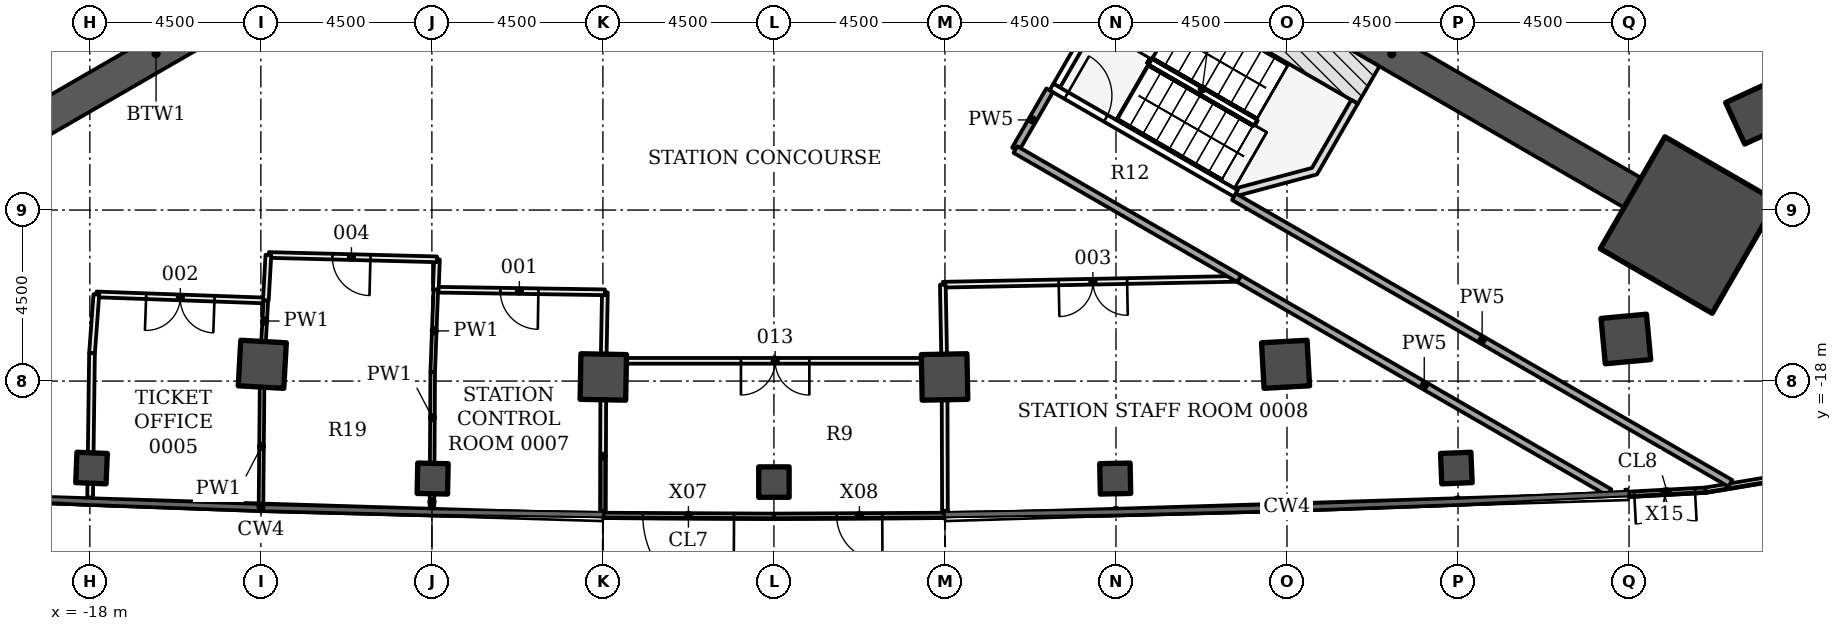
"""IFC4 building model, lengths in metres.
Left out: names, types, materials, properties, quantities, classifications, styles, units other than length and angle.
Written with IfcOpenShell. Run it as: python <this file> out.ifc"""

import sys

from ifc_helpers import new_model, si_unit, direction, frame, frame_2d, origin, origin_2d, place, context, subcontext, project, spatial, polyline, rectangle, outline, extrude, element, fill, save


model = new_model("IFC4")
c1 = context("Model", 3, precision=1e-05, world=origin(), true_north=direction((0.0, 1.0)))
c2 = subcontext(c1, "Body", "Model", "MODEL_VIEW")
j1 = project(units=[si_unit("LENGTHUNIT", "METRE"), si_unit("PLANEANGLEUNIT", "RADIAN")], contexts=[c1])
p1 = place(None, origin())
s1 = spatial("IfcSite", under=j1, at=p1, CompositionType="ELEMENT")
p2 = place(p1, origin())
s2 = spatial("IfcBuilding", under=s1, at=p2, CompositionType="ELEMENT")
p3 = place(p2, origin())
s3 = spatial("IfcBuildingStorey", under=s2, at=p3, CompositionType="ELEMENT", Elevation=0.0)
for number, where, z_axis, x_axis in (
    (1, (-13.462, -17.558, -0.25), (0.0, 0.0, 1.0), (-0.056, -0.998, 0.0)),
    (2, (-4.49, -17.892, -0.25), (0.0, 0.0, 1.0), (-0.019, -1.0, 0.0)),
    (3, (4.49, -17.892, -0.25), (0.0, 0.0, 1.0), (0.019, -1.0, 0.0)),
    (4, (13.462, -17.558, -0.25), (0.0, 0.0, 1.0), (0.056, -0.998, 0.0)),
    (5, (22.417, -16.893, -0.25), (0.0, 0.0, 1.0), (0.093, -0.996, 0.0)),
    (6, (25.838, -10.967, -0.25), (0.0, 0.0, 1.0), (0.909, 0.418, 0.0)),
):
    element("IfcColumn", number, at=place(p3, frame(where, z_axis=z_axis, x_axis=x_axis)), inside=s3, PredefinedType="COLUMN", context=c2, shape_type="SweptSolid", body=[
        extrude(rectangle(XDim=1.2, YDim=1.2, at=origin_2d()), origin(), (0.0, 0.0, 1.0), 6.0),
    ])
for number, where, z_axis, x_axis in (
    (7, (-17.956, -20.288, -0.25), (0.0, 0.0, 1.0), (-0.041, -0.999, 0.0)),
    (8, (-8.98, -20.565, -0.25), (0.0, 0.0, 1.0), (-0.021, -1.0, 0.0)),
    (9, (0.0, -20.657, -0.25), (0.0, 0.0, 1.0), (0.0, -1.0, 0.0)),
    (10, (8.98, -20.565, -0.25), (0.0, 0.0, 1.0), (0.021, -1.0, 0.0)),
    (11, (17.956, -20.288, -0.25), (0.0, 0.0, 1.0), (0.041, -0.999, 0.0)),
):
    element("IfcColumn", number, at=place(p3, frame(where, z_axis=z_axis, x_axis=x_axis)), inside=s3, PredefinedType="COLUMN", context=c2, shape_type="SweptSolid", body=[
        extrude(rectangle(XDim=0.8, YDim=0.8, at=origin_2d()), origin(), (0.0, 0.0, 1.0), 6.0),
    ])
for number, where, z_axis, x_axis in (
    (12, (-9.922, -5.728, -0.25), (0.0, 0.0, 1.0), (-0.866, -0.5, 0.0)),
    (13, (9.922, -5.728, -0.25), (0.0, 0.0, 1.0), (0.866, -0.5, 0.0)),
):
    element("IfcWall", number, at=place(p3, frame(where, z_axis=z_axis, x_axis=x_axis)), inside=s3, PredefinedType="SHEAR", context=c2, shape_type="SweptSolid", body=[
        extrude(rectangle(XDim=14.633, YDim=0.9, at=frame_2d((7.316, 0.0))), origin(), (0.0, 0.0, 1.0), 6.0),
    ])
p4 = place(p3, frame((24.066, -13.895, -0.25), z_axis=(0.0, 0.0, 1.0), x_axis=(0.866025403784, -0.5, 0.0)))
e14 = element("IfcColumn", 14, at=p4, inside=s3, PredefinedType="COLUMN", context=c2, shape_type="SweptSolid", body=[
    extrude(rectangle(XDim=3.4, YDim=3.4, at=origin_2d()), origin(), (0.0, 0.0, 1.0), 6.0),
])
p5 = place(p3, frame((-0.002, -21.547, 0.0), z_axis=(0.0, 0.0, 1.0), x_axis=(-0.999986693461, 0.005158769258, 0.0)))
e15 = element("IfcWall", 15, at=p5, inside=s3, PredefinedType="NOTDEFINED", context=c2, shape_type="SweptSolid", body=[
    extrude(rectangle(XDim=4.496, YDim=0.12, at=frame_2d((2.248, 0.0))), origin(), (0.0, 0.0, 1.0), 5.75),
])
p6 = place(p5, frame((1.048, 0.0, 0.0)))
e16 = element("IfcOpeningElement", 16, at=p6, cuts=e15, PredefinedType="OPENING", context=c2, shape_type="SweptSolid", body=[
    extrude(rectangle(XDim=2.4, YDim=2.4, at=frame_2d((1.2, 1.2))), frame((0.0, 0.07, 0.0), z_axis=(0.0, -1.0, 0.0), x_axis=(1.0, 0.0, 0.0)), (0.0, 0.0, 1.0), 0.14),
])
p7 = place(p3, frame((4.498, -21.524, 0.0), z_axis=(0.0, 0.0, 1.0), x_axis=(-0.999986693461, -0.005158769258, 0.0)))
e17 = element("IfcWall", 17, at=p7, inside=s3, PredefinedType="NOTDEFINED", context=c2, shape_type="SweptSolid", body=[
    extrude(rectangle(XDim=4.496, YDim=0.12, at=frame_2d((2.248, 0.0))), origin(), (0.0, 0.0, 1.0), 5.75),
])
p8 = place(p7, frame((1.648, 0.0, 0.0)))
e18 = element("IfcOpeningElement", 18, at=p8, cuts=e17, PredefinedType="OPENING", context=c2, shape_type="SweptSolid", body=[
    extrude(rectangle(XDim=1.2, YDim=2.4, at=frame_2d((0.6, 1.2))), frame((0.0, 0.07, 0.0), z_axis=(0.0, -1.0, 0.0), x_axis=(1.0, 0.0, 0.0)), (0.0, 0.0, 1.0), 0.14),
])
p9 = place(p3, frame((24.517, -20.861, 0.0), z_axis=(0.0, 0.0, 1.0), x_axis=(-0.998561127478, -0.053625317623, 0.0)))
e19 = element("IfcWall", 19, at=p9, inside=s3, PredefinedType="NOTDEFINED", context=c2, shape_type="SweptSolid", body=[
    extrude(rectangle(XDim=2.031, YDim=0.12, at=frame_2d((1.015, 0.0))), origin(), (0.0, 0.0, 1.0), 5.75),
])
p10 = place(p9, frame((0.283, 0.0, 0.0)))
e20 = element("IfcOpeningElement", 20, at=p10, cuts=e19, PredefinedType="OPENING", context=c2, shape_type="SweptSolid", body=[
    extrude(rectangle(XDim=1.6, YDim=2.4, at=frame_2d((0.8, 1.2))), frame((0.0, 0.07, 0.0), z_axis=(0.0, -1.0, 0.0), x_axis=(1.0, 0.0, 0.0)), (0.0, 0.0, 1.0), 0.14),
])
p11 = place(p3, origin())
e21 = element("IfcWall", 21, at=p11, inside=s3, PredefinedType="NOTDEFINED", context=c2, shape_type="SweptSolid", body=[
    extrude(outline(polyline([(24.522, -20.921), (26.04, -20.666), (27.465, -20.086), (28.729, -19.209), (29.771, -18.077), (30.54, -16.744), (31.0, -15.276), (31.128, -13.742), (30.917, -12.218), (30.379, -10.776), (30.266, -10.818), (30.8, -12.247), (31.007, -13.745), (30.881, -15.252), (30.43, -16.696), (29.674, -18.005), (28.65, -19.118), (27.407, -19.98), (26.007, -20.55), (24.502, -20.802), (24.522, -20.921)])), origin(), (0.0, 0.0, 1.0), 5.75),
])
p12 = place(p3, frame((7.44, -10.226, -0.25), z_axis=(0.0, 0.0, 1.0), x_axis=(0.500022077904, 0.866012656725, 0.0)))
e22 = element("IfcWall", 22, at=p12, inside=s3, PredefinedType="SHEAR", context=c2, shape_type="SweptSolid", body=[
    extrude(rectangle(XDim=3.55, YDim=0.2, at=frame_2d((1.775, 0.0))), origin(), (0.0, 0.0, 1.0), 6.0),
])
p13 = place(p12, frame((1.175, 0.0, 0.25)))
e23 = element("IfcOpeningElement", 23, at=p13, cuts=e22, PredefinedType="OPENING", context=c2, shape_type="SweptSolid", body=[
    extrude(rectangle(XDim=1.2, YDim=2.1, at=frame_2d((0.6, 1.05))), frame((0.0, 0.11, 0.0), z_axis=(0.0, -1.0, 0.0), x_axis=(1.0, 0.0, 0.0)), (0.0, 0.0, 1.0), 0.22),
])
p14 = place(p3, frame((7.304, -10.262, -0.25), z_axis=(0.0, 0.0, 1.0), x_axis=(0.866026594901, -0.49999793692, 0.0)))
e24 = element("IfcWall", 24, at=p14, inside=s3, PredefinedType="SHEAR", context=c2, shape_type="SweptSolid", body=[
    extrude(rectangle(XDim=5.6, YDim=0.2, at=frame_2d((2.8, 0.0))), origin(), (0.0, 0.0, 1.0), 6.0),
])
p15 = place(p14, frame((0.45, 0.0, 0.25)))
e25 = element("IfcOpeningElement", 25, at=p15, cuts=e24, PredefinedType="OPENING", context=c2, shape_type="SweptSolid", body=[
    extrude(rectangle(XDim=1.2, YDim=2.1, at=frame_2d((0.6, 1.05))), frame((0.0, 0.11, 0.0), z_axis=(0.0, -1.0, 0.0), x_axis=(1.0, 0.0, 0.0)), (0.0, 0.0, 1.0), 0.22),
])
p16 = place(p3, frame((9.413, -6.61, -0.25), z_axis=(0.0, 0.0, 1.0), x_axis=(0.866018442252, -0.500012057535, 0.0)))
e26 = element("IfcWall", 26, at=p16, inside=s3, PredefinedType="SHEAR", context=c2, shape_type="SweptSolid", body=[
    extrude(rectangle(XDim=7.2, YDim=1.136, at=frame_2d((3.6, 0.0))), origin(), (0.0, 0.0, 1.0), 6.0),
])
p17 = place(p3, frame((0.0, 0.0, -0.25)))
e27 = element("IfcWall", 27, at=p17, inside=s3, PredefinedType="SHEAR", context=c2, shape_type="SweptSolid", body=[
    extrude(outline(polyline([(12.104, -13.149), (14.289, -12.563), (15.364, -10.701), (15.191, -10.601), (14.157, -12.392), (12.132, -12.934), (12.204, -12.976), (12.204, -12.976), (12.204, -12.976), (12.204, -12.976), (12.204, -12.976), (12.204, -12.976), (12.204, -12.976), (12.204, -12.976), (12.204, -12.976), (12.204, -12.976), (12.204, -12.976), (12.204, -12.976), (12.204, -12.976), (12.204, -12.976), (12.204, -12.976), (12.204, -12.976), (12.204, -12.976), (12.104, -13.149)])), origin(), (0.0, 0.0, 1.0), 6.0),
])
for number, where, z_axis, x_axis in (
    (28, (-4.491, -18.492, 0.0), (0.0, 0.0, 1.0), (-0.003, -1.0, 0.0)),
    (29, (4.5, -21.464, 0.0), (0.0, 0.0, 1.0), (-0.003, 1.0, 0.0)),
):
    element("IfcWall", number, at=place(p3, frame(where, z_axis=z_axis, x_axis=x_axis)), inside=s3, PredefinedType="PARTITIONING", context=c2, shape_type="SweptSolid", body=[
        extrude(rectangle(XDim=2.972, YDim=0.15, at=frame_2d((1.486, 0.0))), origin(), (0.0, 0.0, 1.0), 5.133),
    ])
p18 = place(p3, frame((3.882, -17.467, 0.0), z_axis=(0.0, 0.0, 1.0), x_axis=(-1.0, 0.0, 0.0)))
e30 = element("IfcWall", 30, at=p18, inside=s3, PredefinedType="PARTITIONING", context=c2, shape_type="SweptSolid", body=[
    extrude(rectangle(XDim=7.764, YDim=0.15, at=frame_2d((3.882, 0.0))), origin(), (0.0, 0.0, 1.0), 5.138),
])
p19 = place(p18, frame((2.95, 0.0, 0.0)))
e31 = element("IfcOpeningElement", 31, at=p19, cuts=e30, PredefinedType="OPENING", context=c2, shape_type="SweptSolid", body=[
    extrude(rectangle(XDim=1.8, YDim=2.1, at=frame_2d((0.9, 1.05))), frame((0.0, 0.085, 0.0), z_axis=(0.0, -1.0, 0.0), x_axis=(1.0, 0.0, 0.0)), (0.0, 0.0, 1.0), 0.17),
])
p20 = place(p3, frame((-8.996, -20.965, 0.0), z_axis=(0.0, 0.0, 1.0), x_axis=(-0.006829664275, -0.999976677571, 0.0)))
e32 = element("IfcWall", 32, at=p20, inside=s3, PredefinedType="PARTITIONING", context=c2, shape_type="SweptSolid", body=[
    extrude(rectangle(XDim=0.429, YDim=0.12, at=frame_2d((0.214, 0.0))), origin(), (0.0, 0.0, 1.0), 5.75),
])
p21 = place(p3, frame((-8.897, -15.592, 0.0), z_axis=(0.0, 0.0, 1.0), x_axis=(-0.03723983729, -0.999306356689, 0.0)))
e33 = element("IfcWall", 33, at=p21, inside=s3, PredefinedType="PARTITIONING", context=c2, shape_type="SweptSolid", body=[
    extrude(rectangle(XDim=2.177, YDim=0.12, at=frame_2d((1.088, 0.0))), origin(), (0.0, 0.0, 1.0), 5.138),
])
p22 = place(p3, frame((-8.978, -17.767, 0.0), z_axis=(0.0, 0.0, 1.0), x_axis=(-0.005803200997, -0.999983161287, 0.0)))
e34 = element("IfcWall", 34, at=p22, inside=s3, PredefinedType="PARTITIONING", context=c2, shape_type="SweptSolid", body=[
    extrude(rectangle(XDim=2.398, YDim=0.12, at=frame_2d((1.199, 0.0))), origin(), (0.0, 0.0, 1.0), 5.138),
])
p23 = place(p3, frame((-4.478, -17.292, 0.0), z_axis=(0.0, 0.0, 1.0), x_axis=(0.018443173209, 0.999829910216, 0.0)))
e35 = element("IfcWall", 35, at=p23, inside=s3, PredefinedType="PARTITIONING", context=c2, shape_type="SweptSolid", body=[
    extrude(rectangle(XDim=1.628, YDim=0.15, at=frame_2d((0.814, 0.0))), origin(), (0.0, 0.0, 1.0), 5.138),
])
p24 = place(p3, frame((-4.448, -15.664, 0.0), z_axis=(0.0, 0.0, 1.0), x_axis=(-0.999881808168, 0.015374319343, 0.0)))
e36 = element("IfcWall", 36, at=p24, inside=s3, PredefinedType="PARTITIONING", context=c2, shape_type="SweptSolid", body=[
    extrude(rectangle(XDim=4.43, YDim=0.15, at=frame_2d((2.215, 0.0))), origin(), (0.0, 0.0, 1.0), 5.138),
])
p25 = place(p24, frame((1.75, 0.0, 0.0)))
e37 = element("IfcOpeningElement", 37, at=p25, cuts=e36, PredefinedType="OPENING", context=c2, shape_type="SweptSolid", body=[
    extrude(rectangle(XDim=1.0, YDim=2.1, at=frame_2d((0.5, 1.05))), frame((0.0, 0.085, 0.0), z_axis=(0.0, -1.0, 0.0), x_axis=(1.0, 0.0, 0.0)), (0.0, 0.0, 1.0), 0.17),
])
p26 = place(p3, frame((-13.497, -21.279, 0.0), z_axis=(0.0, 0.0, 1.0), x_axis=(0.009311020464, 0.999956651509, 0.0)))
e38 = element("IfcWall", 38, at=p26, inside=s3, PredefinedType="PARTITIONING", context=c2, shape_type="SweptSolid", body=[
    extrude(rectangle(XDim=3.12, YDim=0.12, at=frame_2d((1.56, 0.0))), origin(), (0.0, 0.0, 1.0), 5.133),
])
p27 = place(p3, frame((-13.429, -16.96, 0.0), z_axis=(0.0, 0.0, 1.0), x_axis=(0.055520018819, 0.998457574216, 0.0)))
e39 = element("IfcWall", 39, at=p27, inside=s3, PredefinedType="PARTITIONING", context=c2, shape_type="SweptSolid", body=[
    extrude(rectangle(XDim=1.082, YDim=0.12, at=frame_2d((0.541, 0.0))), origin(), (0.0, 0.0, 1.0), 5.138),
])
p28 = place(p3, frame((-17.988, -20.688, 0.0), z_axis=(0.0, 0.0, 1.0), x_axis=(-0.011356451033, -0.999935513431, 0.0)))
e40 = element("IfcWall", 40, at=p28, inside=s3, PredefinedType="PARTITIONING", context=c2, shape_type="SweptSolid", body=[
    extrude(rectangle(XDim=0.43, YDim=0.15, at=frame_2d((0.215, 0.0))), origin(), (0.0, 0.0, 1.0), 5.75),
])
p29 = place(p3, frame((-13.37, -15.88, 0.0), z_axis=(0.0, 0.0, 1.0), x_axis=(-0.999355911335, 0.035885407628, 0.0)))
e41 = element("IfcWall", 41, at=p29, inside=s3, PredefinedType="PARTITIONING", context=c2, shape_type="SweptSolid", body=[
    extrude(rectangle(XDim=4.402, YDim=0.15, at=frame_2d((2.201, 0.0))), origin(), (0.0, 0.0, 1.0), 5.138),
])
p30 = place(p29, frame((1.35, 0.0, 0.0)))
e42 = element("IfcOpeningElement", 42, at=p30, cuts=e41, PredefinedType="OPENING", context=c2, shape_type="SweptSolid", body=[
    extrude(rectangle(XDim=1.8, YDim=2.1, at=frame_2d((0.9, 1.05))), frame((0.0, 0.085, 0.0), z_axis=(0.0, -1.0, 0.0), x_axis=(1.0, 0.0, 0.0)), (0.0, 0.0, 1.0), 0.17),
])
p31 = place(p3, frame((-17.769, -15.722, 0.0), z_axis=(0.0, 0.0, 1.0), x_axis=(-0.998720613581, 0.050568132333, 0.0)))
e43 = element("IfcWall", 43, at=p31, inside=s3, PredefinedType="PARTITIONING", context=c2, shape_type="SweptSolid", body=[
    extrude(rectangle(XDim=0.058, YDim=0.15, at=frame_2d((0.029, 0.0))), origin(), (0.0, 0.0, 1.0), 5.138),
])
p32 = place(p3, frame((-17.828, -15.72, 0.0), z_axis=(0.0, 0.0, 1.0), x_axis=(-0.07427744271, -0.997237615368, 0.0)))
e44 = element("IfcWall", 44, at=p32, inside=s3, PredefinedType="PARTITIONING", context=c2, shape_type="SweptSolid", body=[
    extrude(rectangle(XDim=1.552, YDim=0.15, at=frame_2d((0.776, 0.0))), origin(), (0.0, 0.0, 1.0), 5.138),
])
p33 = place(p3, frame((-17.943, -17.267, 0.0), z_axis=(0.0, 0.0, 1.0), x_axis=(-0.012952039932, -0.999916118813, 0.0)))
e45 = element("IfcWall", 45, at=p33, inside=s3, PredefinedType="PARTITIONING", context=c2, shape_type="SweptSolid", body=[
    extrude(rectangle(XDim=2.62, YDim=0.15, at=frame_2d((1.31, 0.0))), origin(), (0.0, 0.0, 1.0), 5.138),
])
p34 = place(p3, frame((21.985, -20.933, 0.0), z_axis=(0.0, 0.0, 1.0), x_axis=(-0.865998466064, 0.500046654598, 0.0)))
e46 = element("IfcWall", 46, at=p34, inside=s3, PredefinedType="PARTITIONING", context=c2, shape_type="SweptSolid", body=[
    extrude(rectangle(XDim=11.255, YDim=0.2, at=frame_2d((5.628, 0.0))), origin(), (0.0, 0.0, 1.0), 5.133),
])
p35 = place(p3, frame((12.242, -15.309, 0.0), z_axis=(0.0, 0.0, 1.0), x_axis=(-0.99980243095, -0.01987709905, 0.0)))
e47 = element("IfcWall", 47, at=p35, inside=s3, PredefinedType="PARTITIONING", context=c2, shape_type="SweptSolid", body=[
    extrude(rectangle(XDim=7.799, YDim=0.15, at=frame_2d((3.9, 0.0))), origin(), (0.0, 0.0, 1.0), 5.138),
])
p36 = place(p35, frame((2.95, 0.0, 0.0)))
e48 = element("IfcOpeningElement", 48, at=p36, cuts=e47, PredefinedType="OPENING", context=c2, shape_type="SweptSolid", body=[
    extrude(rectangle(XDim=1.8, YDim=2.1, at=frame_2d((0.9, 1.05))), frame((0.0, 0.085, 0.0), z_axis=(0.0, -1.0, 0.0), x_axis=(1.0, 0.0, 0.0)), (0.0, 0.0, 1.0), 0.17),
])
p37 = place(p3, frame((4.444, -15.464, 0.0), z_axis=(0.0, 0.0, 1.0), x_axis=(0.018562314819, -0.999827705392, 0.0)))
e49 = element("IfcWall", 49, at=p37, inside=s3, PredefinedType="PARTITIONING", context=c2, shape_type="SweptSolid", body=[
    extrude(rectangle(XDim=1.828, YDim=0.15, at=frame_2d((0.914, 0.0))), origin(), (0.0, 0.0, 1.0), 5.138),
])
p38 = place(p3, frame((-8.897, -15.595, 0.0), z_axis=(0.0, 0.0, 1.0), x_axis=(0.037553693, 0.999294611284, 0.0)))
e50 = element("IfcWall", 50, at=p38, inside=s3, PredefinedType="PARTITIONING", context=c2, shape_type="SweptSolid", body=[
    extrude(rectangle(XDim=0.8, YDim=0.15, at=frame_2d((0.4, 0.0))), origin(), (0.0, 0.0, 1.0), 5.138),
])
p39 = place(p3, frame((-8.867, -14.796, 0.0), z_axis=(0.0, 0.0, 1.0), x_axis=(-0.999668087826, 0.025762650903, 0.0)))
e51 = element("IfcWall", 51, at=p39, inside=s3, PredefinedType="PARTITIONING", context=c2, shape_type="SweptSolid", body=[
    extrude(rectangle(XDim=4.426, YDim=0.15, at=frame_2d((2.213, 0.0))), origin(), (0.0, 0.0, 1.0), 5.138),
])
p40 = place(p39, frame((1.75, 0.0, 0.0)))
e52 = element("IfcOpeningElement", 52, at=p40, cuts=e51, PredefinedType="OPENING", context=c2, shape_type="SweptSolid", body=[
    extrude(rectangle(XDim=1.0, YDim=2.1, at=frame_2d((0.5, 1.05))), frame((0.0, 0.085, 0.0), z_axis=(0.0, -1.0, 0.0), x_axis=(1.0, 0.0, 0.0)), (0.0, 0.0, 1.0), 0.17),
])
p41 = place(p3, frame((-13.302, -14.682, 0.0), z_axis=(0.0, 0.0, 1.0), x_axis=(-0.055797092246, -0.998442128767, 0.0)))
e53 = element("IfcWall", 53, at=p41, inside=s3, PredefinedType="PARTITIONING", context=c2, shape_type="SweptSolid", body=[
    extrude(rectangle(XDim=1.199, YDim=0.15, at=frame_2d((0.6, 0.0))), origin(), (0.0, 0.0, 1.0), 5.138),
])
p42 = place(p3, frame((7.254, -10.35, 0.0), z_axis=(0.0, 0.0, 1.0), x_axis=(-0.50043140051, -0.865776191278, 0.0)))
e54 = element("IfcWall", 54, at=p42, inside=s3, PredefinedType="PARTITIONING", context=c2, shape_type="SweptSolid", body=[
    extrude(rectangle(XDim=1.798, YDim=0.2, at=frame_2d((0.899, 0.0))), origin(), (0.0, 0.0, 1.0), 5.75),
])
p43 = place(p3, frame((6.354, -11.908, 0.0), z_axis=(0.0, 0.0, 1.0), x_axis=(0.866091720682, -0.499885118168, 0.0)))
e55 = element("IfcWall", 55, at=p43, inside=s3, PredefinedType="PARTITIONING", context=c2, shape_type="SweptSolid", body=[
    extrude(rectangle(XDim=6.799, YDim=0.2, at=frame_2d((3.4, 0.0))), origin(), (0.0, 0.0, 1.0), 5.138),
])
p44 = place(p3, frame((25.166, -20.691, 0.0), z_axis=(0.0, 0.0, 1.0), x_axis=(-0.866035175108, 0.499983075189, 0.0)))
e56 = element("IfcWall", 56, at=p44, inside=s3, PredefinedType="PARTITIONING", context=c2, shape_type="SweptSolid", body=[
    extrude(rectangle(XDim=15.083, YDim=0.2, at=frame_2d((7.541, 0.0))), origin(), (0.0, 0.0, 1.0), 5.133),
])
p45 = place(p3, frame((-17.439, -3.908, 0.0), z_axis=(0.0, 0.0, 1.0), x_axis=(-0.866030838723, -0.499990586292, 0.0)))
e57 = element("IfcWall", 57, at=p45, inside=s3, PredefinedType="PARTITIONING", context=c2, shape_type="SweptSolid", body=[
    extrude(rectangle(XDim=15.08, YDim=0.2, at=frame_2d((7.54, 0.0))), origin(), (0.0, 0.0, 1.0), 5.133),
])
p46 = place(p6, origin())
e58 = element("IfcDoor", 58, at=p46, inside=s3, OperationType="REVOLVING", PredefinedType="DOOR", context=c2, shape_type="SweptSolid", body=[
    extrude(rectangle(XDim=2.4, YDim=2.4, at=frame_2d((1.2, 1.2))), frame((0.0, 0.025, 0.0), z_axis=(0.0, -1.0, 0.0), x_axis=(1.0, 0.0, 0.0)), (0.0, 0.0, 1.0), 0.05),
])
fill(e16, e58)
p47 = place(p8, origin())
e59 = element("IfcDoor", 59, at=p47, inside=s3, OperationType="SINGLE_SWING_LEFT", PredefinedType="DOOR", context=c2, shape_type="SweptSolid", body=[
    extrude(rectangle(XDim=1.2, YDim=2.4, at=frame_2d((0.6, 1.2))), frame((0.0, 0.025, 0.0), z_axis=(0.0, -1.0, 0.0), x_axis=(1.0, 0.0, 0.0)), (0.0, 0.0, 1.0), 0.05),
])
fill(e18, e59)
p48 = place(p10, origin())
e60 = element("IfcDoor", 60, at=p48, inside=s3, OperationType="DOUBLE_DOOR_SINGLE_SWING", PredefinedType="DOOR", context=c2, shape_type="SweptSolid", body=[
    extrude(rectangle(XDim=1.6, YDim=2.4, at=frame_2d((0.8, 1.2))), frame((0.0, 0.025, 0.0), z_axis=(0.0, -1.0, 0.0), x_axis=(1.0, 0.0, 0.0)), (0.0, 0.0, 1.0), 0.05),
])
fill(e20, e60)
p49 = place(p15, origin())
e61 = element("IfcDoor", 61, at=p49, inside=s3, OperationType="SINGLE_SWING_LEFT", PredefinedType="DOOR", context=c2, shape_type="SweptSolid", body=[
    extrude(rectangle(XDim=1.2, YDim=2.1, at=frame_2d((0.6, 1.05))), frame((0.0, 0.025, 0.0), z_axis=(0.0, -1.0, 0.0), x_axis=(1.0, 0.0, 0.0)), (0.0, 0.0, 1.0), 0.05),
])
fill(e25, e61)
p50 = place(p25, origin())
e62 = element("IfcDoor", 62, at=p50, inside=s3, OperationType="SINGLE_SWING_RIGHT", PredefinedType="DOOR", context=c2, shape_type="SweptSolid", body=[
    extrude(rectangle(XDim=1.0, YDim=2.1, at=frame_2d((0.5, 1.05))), frame((0.0, 0.025, 0.0), z_axis=(0.0, -1.0, 0.0), x_axis=(1.0, 0.0, 0.0)), (0.0, 0.0, 1.0), 0.05),
])
fill(e37, e62)
p51 = place(p30, origin())
e63 = element("IfcDoor", 63, at=p51, inside=s3, OperationType="DOUBLE_DOOR_SINGLE_SWING", PredefinedType="DOOR", context=c2, shape_type="SweptSolid", body=[
    extrude(rectangle(XDim=1.8, YDim=2.1, at=frame_2d((0.9, 1.05))), frame((0.0, 0.025, 0.0), z_axis=(0.0, -1.0, 0.0), x_axis=(1.0, 0.0, 0.0)), (0.0, 0.0, 1.0), 0.05),
])
fill(e42, e63)
p52 = place(p36, origin())
e64 = element("IfcDoor", 64, at=p52, inside=s3, OperationType="DOUBLE_DOOR_SINGLE_SWING", PredefinedType="DOOR", context=c2, shape_type="SweptSolid", body=[
    extrude(rectangle(XDim=1.8, YDim=2.1, at=frame_2d((0.9, 1.05))), frame((0.0, 0.025, 0.0), z_axis=(0.0, -1.0, 0.0), x_axis=(1.0, 0.0, 0.0)), (0.0, 0.0, 1.0), 0.05),
])
fill(e48, e64)
p53 = place(p40, origin())
e65 = element("IfcDoor", 65, at=p53, inside=s3, OperationType="SINGLE_SWING_RIGHT", PredefinedType="DOOR", context=c2, shape_type="SweptSolid", body=[
    extrude(rectangle(XDim=1.0, YDim=2.1, at=frame_2d((0.5, 1.05))), frame((0.0, 0.025, 0.0), z_axis=(0.0, -1.0, 0.0), x_axis=(1.0, 0.0, 0.0)), (0.0, 0.0, 1.0), 0.05),
])
fill(e52, e65)
p54 = place(p19, origin())
e66 = element("IfcDoor", 66, at=p54, inside=s3, OperationType="DOUBLE_DOOR_SINGLE_SWING", PredefinedType="DOOR", context=c2, shape_type="SweptSolid", body=[
    extrude(rectangle(XDim=1.8, YDim=2.1, at=frame_2d((0.9, 1.05))), frame((0.0, 0.025, 0.0), z_axis=(0.0, -1.0, 0.0), x_axis=(1.0, 0.0, 0.0)), (0.0, 0.0, 1.0), 0.05),
])
fill(e31, e66)
save(model, sys.argv[1])
